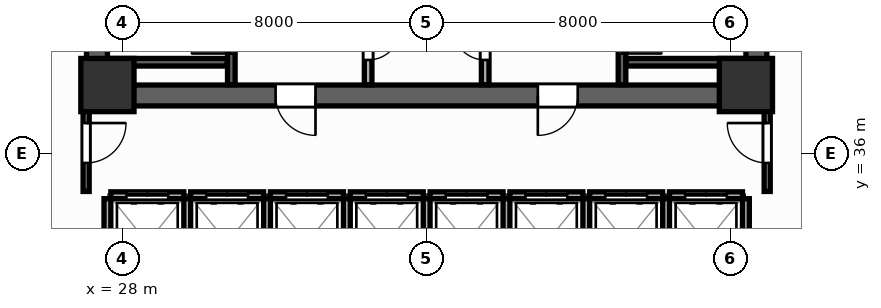
"""IFC4 building model, lengths in metres.
Left out: names, types, materials, properties, quantities, classifications, styles, units other than length and angle.
Written with IfcOpenShell. Run it as: python <this file> out.ifc"""

import sys

from ifc_helpers import new_model, si_unit, direction, frame, frame_2d, origin, origin_2d, place, context, subcontext, project, spatial, rectangle, extrude, source, transform, mapped, element, fill, save


model = new_model("IFC4")
c1 = context("Model", 3, precision=1e-05, world=origin(), true_north=direction((0.0, 1.0)))
c2 = subcontext(c1, "Body", "Model", "MODEL_VIEW")
j1 = project(units=[si_unit("LENGTHUNIT", "METRE"), si_unit("PLANEANGLEUNIT", "RADIAN")], contexts=[c1])
p1 = place(None, origin())
s1 = spatial("IfcSite", under=j1, at=p1, CompositionType="ELEMENT")
p2 = place(p1, origin())
s2 = spatial("IfcBuilding", under=s1, at=p2, CompositionType="ELEMENT")
p3 = place(p2, origin())
s3 = spatial("IfcBuildingStorey", under=s2, at=p3, CompositionType="ELEMENT", Elevation=0.0)
p4 = place(p3, frame((27.05, 37.525, 0.0), z_axis=(0.0, 0.0, 1.0), x_axis=(1.0, 0.0, 0.0)))
e1 = element("IfcWall", 1, at=p4, inside=s3, PredefinedType="SHEAR", context=c2, shape_type="SweptSolid", body=[
    extrude(rectangle(XDim=17.9, YDim=0.55, at=frame_2d((8.95, 0.0))), origin(), (0.0, 0.0, 1.0), 4.8),
])
p5 = place(p4, frame((4.975, 0.0, 0.0)))
e2 = element("IfcOpeningElement", 2, at=p5, cuts=e1, PredefinedType="OPENING", context=c2, shape_type="SweptSolid", body=[
    extrude(rectangle(XDim=1.05, YDim=2.1, at=frame_2d((0.525, 1.05))), frame((0.0, 0.285, 0.0), z_axis=(0.0, -1.0, 0.0), x_axis=(1.0, 0.0, 0.0)), (0.0, 0.0, 1.0), 0.57),
])
p6 = place(p4, frame((11.875, 0.0, 0.0)))
e3 = element("IfcOpeningElement", 3, at=p6, cuts=e1, PredefinedType="OPENING", context=c2, shape_type="SweptSolid", body=[
    extrude(rectangle(XDim=1.05, YDim=2.1, at=frame_2d((0.525, 1.05))), frame((0.0, 0.285, 0.0), z_axis=(0.0, -1.0, 0.0), x_axis=(1.0, 0.0, 0.0)), (0.0, 0.0, 1.0), 0.57),
])
for number, where, z_axis, x_axis in (
    (4, (27.325, 37.8, 0.0), (0.0, 0.0, 1.0), (0.0, 1.0, 0.0)),
    (5, (44.675, 37.8, 0.0), (0.0, 0.0, 1.0), (0.0, 1.0, 0.0)),
):
    element("IfcWall", number, at=place(p3, frame(where, z_axis=z_axis, x_axis=x_axis)), inside=s3, PredefinedType="SHEAR", context=c2, shape_type="SweptSolid", body=[
        extrude(rectangle(XDim=9.0, YDim=0.55, at=frame_2d((4.5, 0.0))), origin(), (0.0, 0.0, 1.0), 4.8),
    ])
m1 = source(origin(), c2, "Body", "SweptSolid", [
    extrude(rectangle(XDim=1.4, YDim=1.4, at=origin_2d()), origin(), (0.0, 0.0, 1.0), 4.8),
])
for number, where, z_axis, x_axis in (
    (6, (27.6, 37.8, 0.0), (0.0, 0.0, 1.0), (1.0, 0.0, 0.0)),
    (7, (44.4, 37.8, 0.0), (0.0, 0.0, 1.0), (1.0, 0.0, 0.0)),
):
    element("IfcColumn", number, at=place(p3, frame(where, z_axis=z_axis, x_axis=x_axis)), inside=s3, PredefinedType="COLUMN", context=c2, shape_type="MappedRepresentation", body=[
        mapped(m1, transform((0.0, 0.0, 0.0), scale=1.0)),
    ])
p7 = place(p3, frame((30.86, 37.81, 0.0), z_axis=(0.0, 0.0, 1.0), x_axis=(0.0, 1.0, 0.0)))
e8 = element("IfcWall", 8, at=p7, inside=s3, PredefinedType="SHEAR", context=c2, shape_type="SweptSolid", body=[
    extrude(rectangle(XDim=8.98, YDim=0.2, at=frame_2d((4.49, 0.0))), origin(), (0.0, 0.0, 1.0), 4.8),
])
p8 = place(p7, frame((0.82, 0.0, 0.0)))
e9 = element("IfcOpeningElement", 9, at=p8, cuts=e8, PredefinedType="OPENING", context=c2, shape_type="SweptSolid", body=[
    extrude(rectangle(XDim=1.05, YDim=2.1, at=frame_2d((0.525, 1.05))), frame((0.0, 0.11, 0.0), z_axis=(0.0, -1.0, 0.0), x_axis=(1.0, 0.0, 0.0)), (0.0, 0.0, 1.0), 0.22),
])
p9 = place(p3, frame((27.61, 38.4, 0.0), z_axis=(0.0, 0.0, 1.0), x_axis=(1.0, 0.0, 0.0)))
e10 = element("IfcWall", 10, at=p9, inside=s3, PredefinedType="SHEAR", context=c2, shape_type="SweptSolid", body=[
    extrude(rectangle(XDim=3.14, YDim=0.2, at=frame_2d((1.57, 0.0))), origin(), (0.0, 0.0, 1.0), 4.8),
])
p10 = place(p3, frame((41.14, 37.81, 0.0), z_axis=(0.0, 0.0, 1.0), x_axis=(0.0, 1.0, 0.0)))
e11 = element("IfcWall", 11, at=p10, inside=s3, PredefinedType="SHEAR", context=c2, shape_type="SweptSolid", body=[
    extrude(rectangle(XDim=8.98, YDim=0.2, at=frame_2d((4.49, 0.0))), origin(), (0.0, 0.0, 1.0), 4.8),
])
p11 = place(p10, frame((0.82, 0.0, 0.0)))
e12 = element("IfcOpeningElement", 12, at=p11, cuts=e11, PredefinedType="OPENING", context=c2, shape_type="SweptSolid", body=[
    extrude(rectangle(XDim=1.05, YDim=2.1, at=frame_2d((0.525, 1.05))), frame((0.0, 0.11, 0.0), z_axis=(0.0, -1.0, 0.0), x_axis=(1.0, 0.0, 0.0)), (0.0, 0.0, 1.0), 0.22),
])
p12 = place(p3, frame((41.25, 38.4, 0.0), z_axis=(0.0, 0.0, 1.0), x_axis=(1.0, 0.0, 0.0)))
e13 = element("IfcWall", 13, at=p12, inside=s3, PredefinedType="SHEAR", context=c2, shape_type="SweptSolid", body=[
    extrude(rectangle(XDim=3.14, YDim=0.2, at=frame_2d((1.57, 0.0))), origin(), (0.0, 0.0, 1.0), 4.8),
])
p13 = place(p3, frame((34.46, 37.81, 0.0), z_axis=(0.0, 0.0, 1.0), x_axis=(0.0, 1.0, 0.0)))
e14 = element("IfcWall", 14, at=p13, inside=s3, PredefinedType="PARTITIONING", context=c2, shape_type="SweptSolid", body=[
    extrude(rectangle(XDim=8.98, YDim=0.2, at=frame_2d((4.49, 0.0))), origin(), (0.0, 0.0, 1.0), 4.52),
])
p14 = place(p13, frame((0.65, 0.0, 0.0)))
e15 = element("IfcOpeningElement", 15, at=p14, cuts=e14, PredefinedType="OPENING", context=c2, shape_type="SweptSolid", body=[
    extrude(rectangle(XDim=0.85, YDim=2.05, at=frame_2d((0.425, 1.025))), frame((0.0, 0.11, 0.0), z_axis=(0.0, -1.0, 0.0), x_axis=(1.0, 0.0, 0.0)), (0.0, 0.0, 1.0), 0.22),
])
p15 = place(p3, frame((37.54, 37.81, 0.0), z_axis=(0.0, 0.0, 1.0), x_axis=(0.0, 1.0, 0.0)))
e16 = element("IfcWall", 16, at=p15, inside=s3, PredefinedType="PARTITIONING", context=c2, shape_type="SweptSolid", body=[
    extrude(rectangle(XDim=8.98, YDim=0.2, at=frame_2d((4.49, 0.0))), origin(), (0.0, 0.0, 1.0), 4.52),
])
p16 = place(p15, frame((0.65, 0.0, 0.0)))
e17 = element("IfcOpeningElement", 17, at=p16, cuts=e16, PredefinedType="OPENING", context=c2, shape_type="SweptSolid", body=[
    extrude(rectangle(XDim=0.85, YDim=2.05, at=frame_2d((0.425, 1.025))), frame((0.0, 0.11, 0.0), z_axis=(0.0, -1.0, 0.0), x_axis=(1.0, 0.0, 0.0)), (0.0, 0.0, 1.0), 0.22),
])
p17 = place(p3, frame((27.69, 34.9, 0.0), z_axis=(0.0, 0.0, 1.0), x_axis=(1.0, 0.0, 0.0)))
e18 = element("IfcWall", 18, at=p17, inside=s3, PredefinedType="PARTITIONING", context=c2, shape_type="SweptSolid", body=[
    extrude(rectangle(XDim=1.92, YDim=0.18, at=frame_2d((0.96, 0.0))), origin(), (0.0, 0.0, 1.0), 4.52),
])
p18 = place(p17, frame((0.41, 0.0, 0.0)))
e19 = element("IfcOpeningElement", 19, at=p18, cuts=e18, PredefinedType="OPENING", context=c2, shape_type="SweptSolid", body=[
    extrude(rectangle(XDim=1.1, YDim=2.1, at=frame_2d((0.55, 1.05))), frame((0.0, 0.1, 0.0), z_axis=(0.0, -1.0, 0.0), x_axis=(1.0, 0.0, 0.0)), (0.0, 0.0, 1.0), 0.2),
])
p19 = place(p3, frame((27.6, 32.49, 0.0), z_axis=(0.0, 0.0, 1.0), x_axis=(0.0, 1.0, 0.0)))
e20 = element("IfcWall", 20, at=p19, inside=s3, PredefinedType="PARTITIONING", context=c2, shape_type="SweptSolid", body=[
    extrude(rectangle(XDim=2.32, YDim=0.18, at=frame_2d((1.16, 0.0))), origin(), (0.0, 0.0, 1.0), 4.52),
])
p20 = place(p3, frame((29.79, 34.9, 0.0), z_axis=(0.0, 0.0, 1.0), x_axis=(1.0, 0.0, 0.0)))
e21 = element("IfcWall", 21, at=p20, inside=s3, PredefinedType="PARTITIONING", context=c2, shape_type="SweptSolid", body=[
    extrude(rectangle(XDim=1.92, YDim=0.18, at=frame_2d((0.96, 0.0))), origin(), (0.0, 0.0, 1.0), 4.52),
])
p21 = place(p20, frame((0.41, 0.0, 0.0)))
e22 = element("IfcOpeningElement", 22, at=p21, cuts=e21, PredefinedType="OPENING", context=c2, shape_type="SweptSolid", body=[
    extrude(rectangle(XDim=1.1, YDim=2.1, at=frame_2d((0.55, 1.05))), frame((0.0, 0.1, 0.0), z_axis=(0.0, -1.0, 0.0), x_axis=(1.0, 0.0, 0.0)), (0.0, 0.0, 1.0), 0.2),
])
p22 = place(p3, frame((29.7, 32.49, 0.0), z_axis=(0.0, 0.0, 1.0), x_axis=(0.0, 1.0, 0.0)))
e23 = element("IfcWall", 23, at=p22, inside=s3, PredefinedType="PARTITIONING", context=c2, shape_type="SweptSolid", body=[
    extrude(rectangle(XDim=2.32, YDim=0.18, at=frame_2d((1.16, 0.0))), origin(), (0.0, 0.0, 1.0), 4.52),
])
p23 = place(p3, frame((31.89, 34.9, 0.0), z_axis=(0.0, 0.0, 1.0), x_axis=(1.0, 0.0, 0.0)))
e24 = element("IfcWall", 24, at=p23, inside=s3, PredefinedType="PARTITIONING", context=c2, shape_type="SweptSolid", body=[
    extrude(rectangle(XDim=1.92, YDim=0.18, at=frame_2d((0.96, 0.0))), origin(), (0.0, 0.0, 1.0), 4.52),
])
p24 = place(p23, frame((0.41, 0.0, 0.0)))
e25 = element("IfcOpeningElement", 25, at=p24, cuts=e24, PredefinedType="OPENING", context=c2, shape_type="SweptSolid", body=[
    extrude(rectangle(XDim=1.1, YDim=2.1, at=frame_2d((0.55, 1.05))), frame((0.0, 0.1, 0.0), z_axis=(0.0, -1.0, 0.0), x_axis=(1.0, 0.0, 0.0)), (0.0, 0.0, 1.0), 0.2),
])
p25 = place(p3, frame((31.8, 32.49, 0.0), z_axis=(0.0, 0.0, 1.0), x_axis=(0.0, 1.0, 0.0)))
e26 = element("IfcWall", 26, at=p25, inside=s3, PredefinedType="PARTITIONING", context=c2, shape_type="SweptSolid", body=[
    extrude(rectangle(XDim=2.32, YDim=0.18, at=frame_2d((1.16, 0.0))), origin(), (0.0, 0.0, 1.0), 4.52),
])
p26 = place(p3, frame((33.99, 34.9, 0.0), z_axis=(0.0, 0.0, 1.0), x_axis=(1.0, 0.0, 0.0)))
e27 = element("IfcWall", 27, at=p26, inside=s3, PredefinedType="PARTITIONING", context=c2, shape_type="SweptSolid", body=[
    extrude(rectangle(XDim=1.92, YDim=0.18, at=frame_2d((0.96, 0.0))), origin(), (0.0, 0.0, 1.0), 4.52),
])
p27 = place(p26, frame((0.41, 0.0, 0.0)))
e28 = element("IfcOpeningElement", 28, at=p27, cuts=e27, PredefinedType="OPENING", context=c2, shape_type="SweptSolid", body=[
    extrude(rectangle(XDim=1.1, YDim=2.1, at=frame_2d((0.55, 1.05))), frame((0.0, 0.1, 0.0), z_axis=(0.0, -1.0, 0.0), x_axis=(1.0, 0.0, 0.0)), (0.0, 0.0, 1.0), 0.2),
])
p28 = place(p3, frame((33.9, 32.49, 0.0), z_axis=(0.0, 0.0, 1.0), x_axis=(0.0, 1.0, 0.0)))
e29 = element("IfcWall", 29, at=p28, inside=s3, PredefinedType="PARTITIONING", context=c2, shape_type="SweptSolid", body=[
    extrude(rectangle(XDim=2.32, YDim=0.18, at=frame_2d((1.16, 0.0))), origin(), (0.0, 0.0, 1.0), 4.52),
])
p29 = place(p3, frame((36.09, 34.9, 0.0), z_axis=(0.0, 0.0, 1.0), x_axis=(1.0, 0.0, 0.0)))
e30 = element("IfcWall", 30, at=p29, inside=s3, PredefinedType="PARTITIONING", context=c2, shape_type="SweptSolid", body=[
    extrude(rectangle(XDim=1.92, YDim=0.18, at=frame_2d((0.96, 0.0))), origin(), (0.0, 0.0, 1.0), 4.52),
])
p30 = place(p29, frame((0.41, 0.0, 0.0)))
e31 = element("IfcOpeningElement", 31, at=p30, cuts=e30, PredefinedType="OPENING", context=c2, shape_type="SweptSolid", body=[
    extrude(rectangle(XDim=1.1, YDim=2.1, at=frame_2d((0.55, 1.05))), frame((0.0, 0.1, 0.0), z_axis=(0.0, -1.0, 0.0), x_axis=(1.0, 0.0, 0.0)), (0.0, 0.0, 1.0), 0.2),
])
p31 = place(p3, frame((36.0, 32.49, 0.0), z_axis=(0.0, 0.0, 1.0), x_axis=(0.0, 1.0, 0.0)))
e32 = element("IfcWall", 32, at=p31, inside=s3, PredefinedType="PARTITIONING", context=c2, shape_type="SweptSolid", body=[
    extrude(rectangle(XDim=2.32, YDim=0.18, at=frame_2d((1.16, 0.0))), origin(), (0.0, 0.0, 1.0), 4.52),
])
p32 = place(p3, frame((38.19, 34.9, 0.0), z_axis=(0.0, 0.0, 1.0), x_axis=(1.0, 0.0, 0.0)))
e33 = element("IfcWall", 33, at=p32, inside=s3, PredefinedType="PARTITIONING", context=c2, shape_type="SweptSolid", body=[
    extrude(rectangle(XDim=1.92, YDim=0.18, at=frame_2d((0.96, 0.0))), origin(), (0.0, 0.0, 1.0), 4.52),
])
p33 = place(p32, frame((0.41, 0.0, 0.0)))
e34 = element("IfcOpeningElement", 34, at=p33, cuts=e33, PredefinedType="OPENING", context=c2, shape_type="SweptSolid", body=[
    extrude(rectangle(XDim=1.1, YDim=2.1, at=frame_2d((0.55, 1.05))), frame((0.0, 0.1, 0.0), z_axis=(0.0, -1.0, 0.0), x_axis=(1.0, 0.0, 0.0)), (0.0, 0.0, 1.0), 0.2),
])
p34 = place(p3, frame((38.1, 32.49, 0.0), z_axis=(0.0, 0.0, 1.0), x_axis=(0.0, 1.0, 0.0)))
e35 = element("IfcWall", 35, at=p34, inside=s3, PredefinedType="PARTITIONING", context=c2, shape_type="SweptSolid", body=[
    extrude(rectangle(XDim=2.32, YDim=0.18, at=frame_2d((1.16, 0.0))), origin(), (0.0, 0.0, 1.0), 4.52),
])
p35 = place(p3, frame((40.29, 34.9, 0.0), z_axis=(0.0, 0.0, 1.0), x_axis=(1.0, 0.0, 0.0)))
e36 = element("IfcWall", 36, at=p35, inside=s3, PredefinedType="PARTITIONING", context=c2, shape_type="SweptSolid", body=[
    extrude(rectangle(XDim=1.92, YDim=0.18, at=frame_2d((0.96, 0.0))), origin(), (0.0, 0.0, 1.0), 4.52),
])
p36 = place(p35, frame((0.41, 0.0, 0.0)))
e37 = element("IfcOpeningElement", 37, at=p36, cuts=e36, PredefinedType="OPENING", context=c2, shape_type="SweptSolid", body=[
    extrude(rectangle(XDim=1.1, YDim=2.1, at=frame_2d((0.55, 1.05))), frame((0.0, 0.1, 0.0), z_axis=(0.0, -1.0, 0.0), x_axis=(1.0, 0.0, 0.0)), (0.0, 0.0, 1.0), 0.2),
])
p37 = place(p3, frame((40.2, 32.49, 0.0), z_axis=(0.0, 0.0, 1.0), x_axis=(0.0, 1.0, 0.0)))
e38 = element("IfcWall", 38, at=p37, inside=s3, PredefinedType="PARTITIONING", context=c2, shape_type="SweptSolid", body=[
    extrude(rectangle(XDim=2.32, YDim=0.18, at=frame_2d((1.16, 0.0))), origin(), (0.0, 0.0, 1.0), 4.52),
])
p38 = place(p3, frame((42.39, 34.9, 0.0), z_axis=(0.0, 0.0, 1.0), x_axis=(1.0, 0.0, 0.0)))
e39 = element("IfcWall", 39, at=p38, inside=s3, PredefinedType="PARTITIONING", context=c2, shape_type="SweptSolid", body=[
    extrude(rectangle(XDim=1.92, YDim=0.18, at=frame_2d((0.96, 0.0))), origin(), (0.0, 0.0, 1.0), 4.52),
])
p39 = place(p38, frame((0.41, 0.0, 0.0)))
e40 = element("IfcOpeningElement", 40, at=p39, cuts=e39, PredefinedType="OPENING", context=c2, shape_type="SweptSolid", body=[
    extrude(rectangle(XDim=1.1, YDim=2.1, at=frame_2d((0.55, 1.05))), frame((0.0, 0.1, 0.0), z_axis=(0.0, -1.0, 0.0), x_axis=(1.0, 0.0, 0.0)), (0.0, 0.0, 1.0), 0.2),
])
for number, where, z_axis, x_axis in (
    (41, (42.3, 32.49, 0.0), (0.0, 0.0, 1.0), (0.0, 1.0, 0.0)),
    (42, (44.4, 32.49, 0.0), (0.0, 0.0, 1.0), (0.0, 1.0, 0.0)),
):
    element("IfcWall", number, at=place(p3, frame(where, z_axis=z_axis, x_axis=x_axis)), inside=s3, PredefinedType="PARTITIONING", context=c2, shape_type="SweptSolid", body=[
        extrude(rectangle(XDim=2.32, YDim=0.18, at=frame_2d((1.16, 0.0))), origin(), (0.0, 0.0, 1.0), 4.52),
    ])
p40 = place(p3, frame((27.04, 35.0, 0.0), z_axis=(0.0, 0.0, 1.0), x_axis=(0.0, 1.0, 0.0)))
e43 = element("IfcWall", 43, at=p40, inside=s3, PredefinedType="PARTITIONING", context=c2, shape_type="SweptSolid", body=[
    extrude(rectangle(XDim=2.65, YDim=0.16, at=frame_2d((1.325, 0.0))), origin(), (0.0, 0.0, 1.0), 4.52),
])
p41 = place(p40, frame((0.75, 0.0, 0.0)))
e44 = element("IfcOpeningElement", 44, at=p41, cuts=e43, PredefinedType="OPENING", context=c2, shape_type="SweptSolid", body=[
    extrude(rectangle(XDim=1.05, YDim=2.1, at=frame_2d((0.525, 1.05))), frame((0.0, 0.09, 0.0), z_axis=(0.0, -1.0, 0.0), x_axis=(1.0, 0.0, 0.0)), (0.0, 0.0, 1.0), 0.18),
])
p42 = place(p3, frame((44.96, 35.0, 0.0), z_axis=(0.0, 0.0, 1.0), x_axis=(0.0, 1.0, 0.0)))
e45 = element("IfcWall", 45, at=p42, inside=s3, PredefinedType="PARTITIONING", context=c2, shape_type="SweptSolid", body=[
    extrude(rectangle(XDim=2.65, YDim=0.16, at=frame_2d((1.325, 0.0))), origin(), (0.0, 0.0, 1.0), 4.52),
])
p43 = place(p42, frame((0.75, 0.0, 0.0)))
e46 = element("IfcOpeningElement", 46, at=p43, cuts=e45, PredefinedType="OPENING", context=c2, shape_type="SweptSolid", body=[
    extrude(rectangle(XDim=1.05, YDim=2.1, at=frame_2d((0.525, 1.05))), frame((0.0, 0.09, 0.0), z_axis=(0.0, -1.0, 0.0), x_axis=(1.0, 0.0, 0.0)), (0.0, 0.0, 1.0), 0.18),
])
p44 = place(p8, origin())
e47 = element("IfcDoor", 47, at=p44, inside=s3, OperationType="SINGLE_SWING_LEFT", PredefinedType="DOOR", context=c2, shape_type="SweptSolid", body=[
    extrude(rectangle(XDim=1.05, YDim=2.1, at=frame_2d((0.525, 1.05))), frame((0.0, 0.025, 0.0), z_axis=(0.0, -1.0, 0.0), x_axis=(1.0, 0.0, 0.0)), (0.0, 0.0, 1.0), 0.05),
])
fill(e9, e47)
p45 = place(p11, frame((1.05, 0.0, 0.0), z_axis=(0.0, 0.0, 1.0), x_axis=(-1.0, 0.0, 0.0)))
e48 = element("IfcDoor", 48, at=p45, inside=s3, OperationType="SINGLE_SWING_RIGHT", PredefinedType="DOOR", context=c2, shape_type="SweptSolid", body=[
    extrude(rectangle(XDim=1.05, YDim=2.1, at=frame_2d((0.525, 1.05))), frame((0.0, 0.025, 0.0), z_axis=(0.0, -1.0, 0.0), x_axis=(1.0, 0.0, 0.0)), (0.0, 0.0, 1.0), 0.05),
])
fill(e12, e48)
p46 = place(p14, frame((0.85, 0.0, 0.0), z_axis=(0.0, 0.0, 1.0), x_axis=(-1.0, 0.0, 0.0)))
e49 = element("IfcDoor", 49, at=p46, inside=s3, OperationType="SINGLE_SWING_LEFT", PredefinedType="DOOR", context=c2, shape_type="SweptSolid", body=[
    extrude(rectangle(XDim=0.85, YDim=2.05, at=frame_2d((0.425, 1.025))), frame((0.0, 0.025, 0.0), z_axis=(0.0, -1.0, 0.0), x_axis=(1.0, 0.0, 0.0)), (0.0, 0.0, 1.0), 0.05),
])
fill(e15, e49)
p47 = place(p16, origin())
e50 = element("IfcDoor", 50, at=p47, inside=s3, OperationType="SINGLE_SWING_RIGHT", PredefinedType="DOOR", context=c2, shape_type="SweptSolid", body=[
    extrude(rectangle(XDim=0.85, YDim=2.05, at=frame_2d((0.425, 1.025))), frame((0.0, 0.025, 0.0), z_axis=(0.0, -1.0, 0.0), x_axis=(1.0, 0.0, 0.0)), (0.0, 0.0, 1.0), 0.05),
])
fill(e17, e50)
p48 = place(p18, origin())
e51 = element("IfcDoor", 51, at=p48, inside=s3, OperationType="DOUBLE_DOOR_SLIDING", PredefinedType="DOOR", context=c2, shape_type="SweptSolid", body=[
    extrude(rectangle(XDim=1.1, YDim=2.1, at=frame_2d((0.55, 1.05))), frame((0.0, 0.025, 0.0), z_axis=(0.0, -1.0, 0.0), x_axis=(1.0, 0.0, 0.0)), (0.0, 0.0, 1.0), 0.05),
])
fill(e19, e51)
p49 = place(p21, origin())
e52 = element("IfcDoor", 52, at=p49, inside=s3, OperationType="DOUBLE_DOOR_SLIDING", PredefinedType="DOOR", context=c2, shape_type="SweptSolid", body=[
    extrude(rectangle(XDim=1.1, YDim=2.1, at=frame_2d((0.55, 1.05))), frame((0.0, 0.025, 0.0), z_axis=(0.0, -1.0, 0.0), x_axis=(1.0, 0.0, 0.0)), (0.0, 0.0, 1.0), 0.05),
])
fill(e22, e52)
p50 = place(p24, origin())
e53 = element("IfcDoor", 53, at=p50, inside=s3, OperationType="DOUBLE_DOOR_SLIDING", PredefinedType="DOOR", context=c2, shape_type="SweptSolid", body=[
    extrude(rectangle(XDim=1.1, YDim=2.1, at=frame_2d((0.55, 1.05))), frame((0.0, 0.025, 0.0), z_axis=(0.0, -1.0, 0.0), x_axis=(1.0, 0.0, 0.0)), (0.0, 0.0, 1.0), 0.05),
])
fill(e25, e53)
p51 = place(p27, origin())
e54 = element("IfcDoor", 54, at=p51, inside=s3, OperationType="DOUBLE_DOOR_SLIDING", PredefinedType="DOOR", context=c2, shape_type="SweptSolid", body=[
    extrude(rectangle(XDim=1.1, YDim=2.1, at=frame_2d((0.55, 1.05))), frame((0.0, 0.025, 0.0), z_axis=(0.0, -1.0, 0.0), x_axis=(1.0, 0.0, 0.0)), (0.0, 0.0, 1.0), 0.05),
])
fill(e28, e54)
p52 = place(p30, origin())
e55 = element("IfcDoor", 55, at=p52, inside=s3, OperationType="DOUBLE_DOOR_SLIDING", PredefinedType="DOOR", context=c2, shape_type="SweptSolid", body=[
    extrude(rectangle(XDim=1.1, YDim=2.1, at=frame_2d((0.55, 1.05))), frame((0.0, 0.025, 0.0), z_axis=(0.0, -1.0, 0.0), x_axis=(1.0, 0.0, 0.0)), (0.0, 0.0, 1.0), 0.05),
])
fill(e31, e55)
p53 = place(p33, origin())
e56 = element("IfcDoor", 56, at=p53, inside=s3, OperationType="DOUBLE_DOOR_SLIDING", PredefinedType="DOOR", context=c2, shape_type="SweptSolid", body=[
    extrude(rectangle(XDim=1.1, YDim=2.1, at=frame_2d((0.55, 1.05))), frame((0.0, 0.025, 0.0), z_axis=(0.0, -1.0, 0.0), x_axis=(1.0, 0.0, 0.0)), (0.0, 0.0, 1.0), 0.05),
])
fill(e34, e56)
p54 = place(p36, origin())
e57 = element("IfcDoor", 57, at=p54, inside=s3, OperationType="DOUBLE_DOOR_SLIDING", PredefinedType="DOOR", context=c2, shape_type="SweptSolid", body=[
    extrude(rectangle(XDim=1.1, YDim=2.1, at=frame_2d((0.55, 1.05))), frame((0.0, 0.025, 0.0), z_axis=(0.0, -1.0, 0.0), x_axis=(1.0, 0.0, 0.0)), (0.0, 0.0, 1.0), 0.05),
])
fill(e37, e57)
p55 = place(p39, origin())
e58 = element("IfcDoor", 58, at=p55, inside=s3, OperationType="DOUBLE_DOOR_SLIDING", PredefinedType="DOOR", context=c2, shape_type="SweptSolid", body=[
    extrude(rectangle(XDim=1.1, YDim=2.1, at=frame_2d((0.55, 1.05))), frame((0.0, 0.025, 0.0), z_axis=(0.0, -1.0, 0.0), x_axis=(1.0, 0.0, 0.0)), (0.0, 0.0, 1.0), 0.05),
])
fill(e40, e58)
p56 = place(p41, frame((1.05, 0.0, 0.0), z_axis=(0.0, 0.0, 1.0), x_axis=(-1.0, 0.0, 0.0)))
e59 = element("IfcDoor", 59, at=p56, inside=s3, OperationType="SINGLE_SWING_LEFT", PredefinedType="DOOR", context=c2, shape_type="SweptSolid", body=[
    extrude(rectangle(XDim=1.05, YDim=2.1, at=frame_2d((0.525, 1.05))), frame((0.0, 0.025, 0.0), z_axis=(0.0, -1.0, 0.0), x_axis=(1.0, 0.0, 0.0)), (0.0, 0.0, 1.0), 0.05),
])
fill(e44, e59)
p57 = place(p43, origin())
e60 = element("IfcDoor", 60, at=p57, inside=s3, OperationType="SINGLE_SWING_RIGHT", PredefinedType="DOOR", context=c2, shape_type="SweptSolid", body=[
    extrude(rectangle(XDim=1.05, YDim=2.1, at=frame_2d((0.525, 1.05))), frame((0.0, 0.025, 0.0), z_axis=(0.0, -1.0, 0.0), x_axis=(1.0, 0.0, 0.0)), (0.0, 0.0, 1.0), 0.05),
])
fill(e46, e60)
p58 = place(p5, frame((1.05, 0.0, 0.0), z_axis=(0.0, 0.0, 1.0), x_axis=(-1.0, 0.0, 0.0)))
e61 = element("IfcDoor", 61, at=p58, inside=s3, OperationType="SINGLE_SWING_LEFT", PredefinedType="DOOR", context=c2, shape_type="SweptSolid", body=[
    extrude(rectangle(XDim=1.05, YDim=2.1, at=frame_2d((0.525, 1.05))), frame((0.0, 0.025, 0.0), z_axis=(0.0, -1.0, 0.0), x_axis=(1.0, 0.0, 0.0)), (0.0, 0.0, 1.0), 0.05),
])
fill(e2, e61)
p59 = place(p6, frame((1.05, 0.0, 0.0), z_axis=(0.0, 0.0, 1.0), x_axis=(-1.0, 0.0, 0.0)))
e62 = element("IfcDoor", 62, at=p59, inside=s3, OperationType="SINGLE_SWING_RIGHT", PredefinedType="DOOR", context=c2, shape_type="SweptSolid", body=[
    extrude(rectangle(XDim=1.05, YDim=2.1, at=frame_2d((0.525, 1.05))), frame((0.0, 0.025, 0.0), z_axis=(0.0, -1.0, 0.0), x_axis=(1.0, 0.0, 0.0)), (0.0, 0.0, 1.0), 0.05),
])
fill(e3, e62)
save(model, sys.argv[1])
